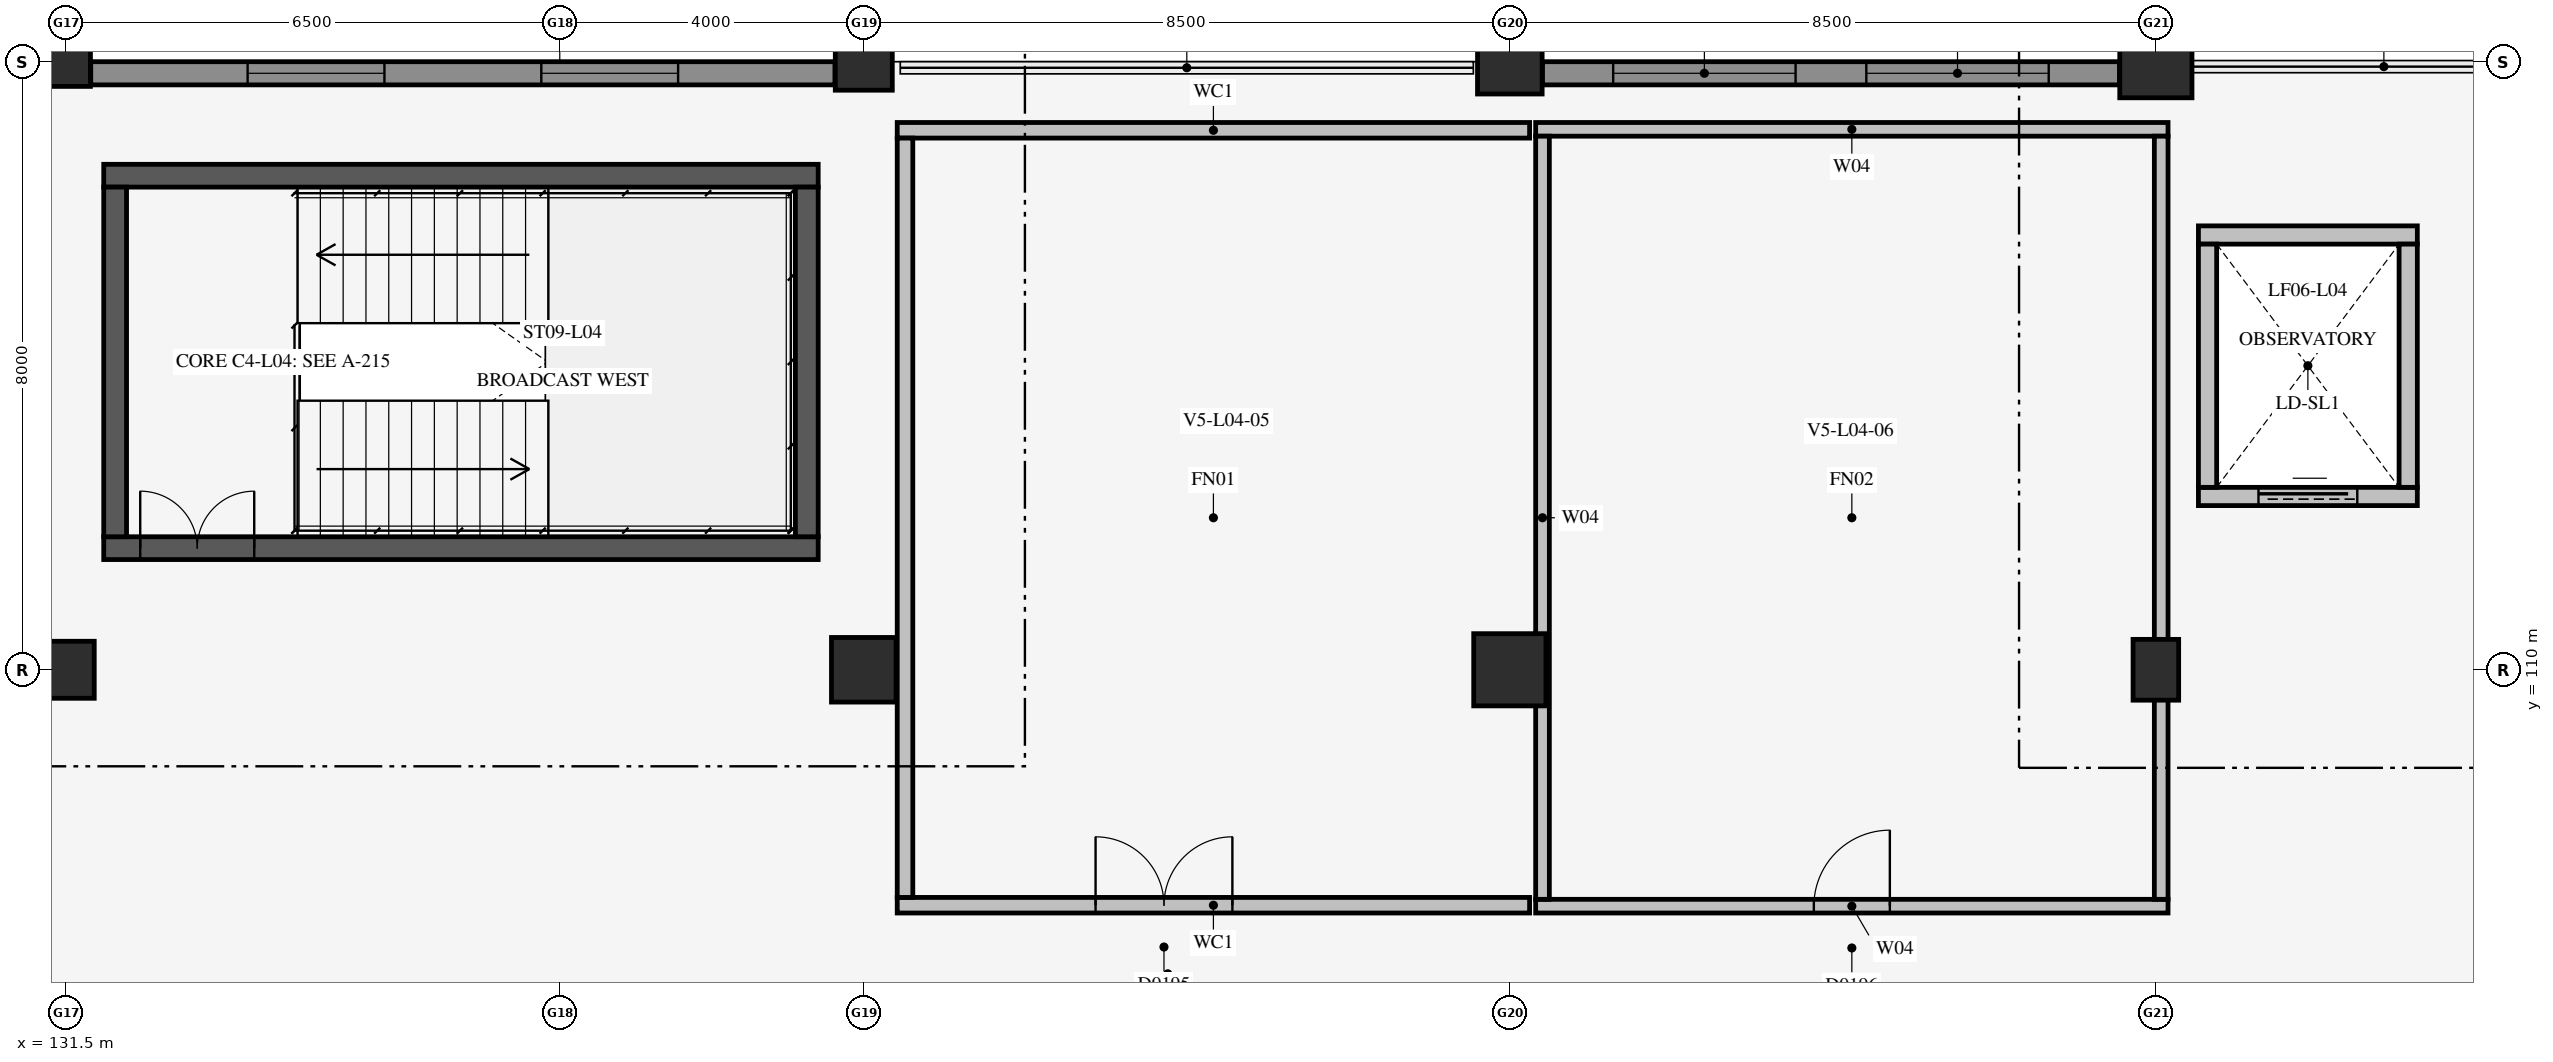
"""IFC4 building model, lengths in metres.
Left out: names, types, materials, properties, quantities, classifications, styles, units other than length and angle.
Written with IfcOpenShell. Run it as: python <this file> out.ifc"""

import sys

from ifc_helpers import new_model, si_unit, direction, frame, frame_2d, origin, origin_2d, place, context, subcontext, project, spatial, rectangle, extrude, element, fill, save


model = new_model("IFC4")
c1 = context("Model", 3, precision=1e-05, world=origin(), true_north=direction((0.0, 1.0)))
c2 = subcontext(c1, "Body", "Model", "MODEL_VIEW")
j1 = project(units=[si_unit("LENGTHUNIT", "METRE"), si_unit("PLANEANGLEUNIT", "RADIAN")], contexts=[c1])
p1 = place(None, origin())
s1 = spatial("IfcSite", under=j1, at=p1, CompositionType="ELEMENT")
p2 = place(p1, origin())
s2 = spatial("IfcBuilding", under=s1, at=p2, CompositionType="ELEMENT")
p3 = place(p2, frame((0.0, 0.0, 19.0)))
s3 = spatial("IfcBuildingStorey", under=s2, at=p3, CompositionType="ELEMENT", Elevation=19.0)
p4 = place(p3, frame((132.0, 111.6, 0.0), z_axis=(0.0, 0.0, 1.0), x_axis=(1.0, 0.0, 0.0)))
e1 = element("IfcWall", 1, at=p4, inside=s3, PredefinedType="SHEAR", context=c2, shape_type="SweptSolid", body=[
    extrude(rectangle(XDim=9.4, YDim=0.3, at=frame_2d((4.7, 0.0))), origin(), (0.0, 0.0, 1.0), 3.85),
])
p5 = place(p4, frame((0.48, 0.0, 0.0)))
e2 = element("IfcOpeningElement", 2, at=p5, cuts=e1, PredefinedType="OPENING", context=c2, shape_type="SweptSolid", body=[
    extrude(rectangle(XDim=1.5, YDim=2.3, at=frame_2d((0.75, 1.15))), frame((0.0, 0.162, 0.0), z_axis=(0.0, -1.0, 0.0), x_axis=(1.0, 0.0, 0.0)), (0.0, 0.0, 1.0), 0.324),
])
p6 = place(p3, frame((132.0, 116.5, 0.0), z_axis=(0.0, 0.0, 1.0), x_axis=(1.0, 0.0, 0.0)))
e3 = element("IfcWall", 3, at=p6, inside=s3, PredefinedType="SHEAR", context=c2, shape_type="SweptSolid", body=[
    extrude(rectangle(XDim=9.4, YDim=0.3, at=frame_2d((4.7, 0.0))), origin(), (0.0, 0.0, 1.0), 3.85),
])
for number, where, z_axis, x_axis in (
    (4, (132.15, 111.75, 0.0), (0.0, 0.0, 1.0), (0.0, 1.0, 0.0)),
    (5, (141.25, 111.75, 0.0), (0.0, 0.0, 1.0), (0.0, 1.0, 0.0)),
):
    element("IfcWall", number, at=place(p3, frame(where, z_axis=z_axis, x_axis=x_axis)), inside=s3, PredefinedType="SHEAR", context=c2, shape_type="SweptSolid", body=[
        extrude(rectangle(XDim=4.6, YDim=0.3, at=frame_2d((2.3, 0.0))), origin(), (0.0, 0.0, 1.0), 3.85),
    ])
p7 = place(p3, frame((159.56, 112.28, 0.0), z_axis=(0.0, 0.0, 1.0), x_axis=(1.0, 0.0, 0.0)))
e6 = element("IfcWall", 6, at=p7, inside=s3, PredefinedType="SOLIDWALL", context=c2, shape_type="SweptSolid", body=[
    extrude(rectangle(XDim=2.88, YDim=0.24, at=frame_2d((1.44, 0.0))), origin(), (0.0, 0.0, 1.0), 3.45),
])
p8 = place(p7, frame((0.79, 0.0, 0.0)))
e7 = element("IfcOpeningElement", 7, at=p8, cuts=e6, PredefinedType="OPENING", context=c2, shape_type="SweptSolid", body=[
    extrude(rectangle(XDim=1.3, YDim=2.25, at=frame_2d((0.65, 1.125))), frame((0.0, 0.132, 0.0), z_axis=(0.0, -1.0, 0.0), x_axis=(1.0, 0.0, 0.0)), (0.0, 0.0, 1.0), 0.264),
])
p9 = place(p3, frame((159.56, 115.72, 0.0), z_axis=(0.0, 0.0, 1.0), x_axis=(1.0, 0.0, 0.0)))
e8 = element("IfcWall", 8, at=p9, inside=s3, PredefinedType="SOLIDWALL", context=c2, shape_type="SweptSolid", body=[
    extrude(rectangle(XDim=2.88, YDim=0.24, at=frame_2d((1.44, 0.0))), origin(), (0.0, 0.0, 1.0), 3.45),
])
for number, where, z_axis, x_axis in (
    (9, (159.68, 112.4, 0.0), (0.0, 0.0, 1.0), (0.0, 1.0, 0.0)),
    (10, (162.32, 112.4, 0.0), (0.0, 0.0, 1.0), (0.0, 1.0, 0.0)),
):
    element("IfcWall", number, at=place(p3, frame(where, z_axis=z_axis, x_axis=x_axis)), inside=s3, PredefinedType="SOLIDWALL", context=c2, shape_type="SweptSolid", body=[
        extrude(rectangle(XDim=3.2, YDim=0.24, at=frame_2d((1.6, 0.0))), origin(), (0.0, 0.0, 1.0), 3.45),
    ])
p10 = place(p3, frame((131.5, 110.0, 0.0), z_axis=(0.0, 0.0, 1.0), x_axis=(1.0, 0.0, 0.0)))
e11 = element("IfcColumn", 11, at=p10, inside=s3, PredefinedType="COLUMN", context=c2, shape_type="SweptSolid", body=[
    extrude(rectangle(XDim=0.75, YDim=0.75, at=origin_2d()), origin(), (0.0, 0.0, 1.0), 3.85),
])
p11 = place(p3, frame((131.5, 118.0, 0.0), z_axis=(0.0, 0.0, 1.0), x_axis=(1.0, 0.0, 0.0)))
e12 = element("IfcColumn", 12, at=p11, inside=s3, PredefinedType="COLUMN", context=c2, shape_type="SweptSolid", body=[
    extrude(rectangle(XDim=0.65, YDim=0.65, at=origin_2d()), origin(), (0.0, 0.0, 1.0), 3.85),
])
p12 = place(p3, frame((142.0, 110.0, 0.0), z_axis=(0.0, 0.0, 1.0), x_axis=(1.0, 0.0, 0.0)))
e13 = element("IfcColumn", 13, at=p12, inside=s3, PredefinedType="COLUMN", context=c2, shape_type="SweptSolid", body=[
    extrude(rectangle(XDim=0.85, YDim=0.85, at=origin_2d()), origin(), (0.0, 0.0, 1.0), 3.85),
])
p13 = place(p3, frame((142.0, 118.0, 0.0), z_axis=(0.0, 0.0, 1.0), x_axis=(1.0, 0.0, 0.0)))
e14 = element("IfcColumn", 14, at=p13, inside=s3, PredefinedType="COLUMN", context=c2, shape_type="SweptSolid", body=[
    extrude(rectangle(XDim=0.75, YDim=0.75, at=origin_2d()), origin(), (0.0, 0.0, 1.0), 3.85),
])
p14 = place(p3, frame((150.5, 110.0, 0.0), z_axis=(0.0, 0.0, 1.0), x_axis=(1.0, 0.0, 0.0)))
e15 = element("IfcColumn", 15, at=p14, inside=s3, PredefinedType="COLUMN", context=c2, shape_type="SweptSolid", body=[
    extrude(rectangle(XDim=0.95, YDim=0.95, at=origin_2d()), origin(), (0.0, 0.0, 1.0), 3.85),
])
p15 = place(p3, frame((150.5, 118.0, 0.0), z_axis=(0.0, 0.0, 1.0), x_axis=(1.0, 0.0, 0.0)))
e16 = element("IfcColumn", 16, at=p15, inside=s3, PredefinedType="COLUMN", context=c2, shape_type="SweptSolid", body=[
    extrude(rectangle(XDim=0.85, YDim=0.85, at=origin_2d()), origin(), (0.0, 0.0, 1.0), 3.85),
])
p16 = place(p3, frame((159.0, 110.0, 0.0), z_axis=(0.0, 0.0, 1.0), x_axis=(1.0, 0.0, 0.0)))
e17 = element("IfcColumn", 17, at=p16, inside=s3, PredefinedType="COLUMN", context=c2, shape_type="SweptSolid", body=[
    extrude(rectangle(XDim=0.6, YDim=0.8, at=origin_2d()), origin(), (0.0, 0.0, 1.0), 3.85),
])
p17 = place(p3, frame((159.0, 118.0, 0.0), z_axis=(0.0, 0.0, 1.0), x_axis=(1.0, 0.0, 0.0)))
e18 = element("IfcColumn", 18, at=p17, inside=s3, PredefinedType="COLUMN", context=c2, shape_type="SweptSolid", body=[
    extrude(rectangle(XDim=0.95, YDim=0.95, at=origin_2d()), origin(), (0.0, 0.0, 1.0), 3.85),
])
p18 = place(p3, frame((142.44, 106.903, 0.0), z_axis=(0.0, 0.0, 1.0), x_axis=(1.0, 0.0, 0.0)))
e19 = element("IfcWall", 19, at=p18, inside=s3, PredefinedType="SOLIDWALL", context=c2, shape_type="SweptSolid", body=[
    extrude(rectangle(XDim=8.32, YDim=0.205, at=frame_2d((4.16, 0.0))), origin(), (0.0, 0.0, 1.0), 3.835),
])
p19 = place(p18, frame((2.61, 0.0, 0.0)))
e20 = element("IfcOpeningElement", 20, at=p19, cuts=e19, PredefinedType="OPENING", context=c2, shape_type="SweptSolid", body=[
    extrude(rectangle(XDim=1.8, YDim=2.35, at=frame_2d((0.9, 1.175))), frame((0.0, 0.115, 0.0), z_axis=(0.0, -1.0, 0.0), x_axis=(1.0, 0.0, 0.0)), (0.0, 0.0, 1.0), 0.229),
])
p20 = place(p3, frame((142.44, 117.097, 0.0), z_axis=(0.0, 0.0, 1.0), x_axis=(1.0, 0.0, 0.0)))
e21 = element("IfcWall", 21, at=p20, inside=s3, PredefinedType="SOLIDWALL", context=c2, shape_type="SweptSolid", body=[
    extrude(rectangle(XDim=8.32, YDim=0.205, at=frame_2d((4.16, 0.0))), origin(), (0.0, 0.0, 1.0), 3.835),
])
p21 = place(p3, frame((142.542, 107.005, 0.0), z_axis=(0.0, 0.0, 1.0), x_axis=(0.0, 1.0, 0.0)))
e22 = element("IfcWall", 22, at=p21, inside=s3, PredefinedType="SOLIDWALL", context=c2, shape_type="SweptSolid", body=[
    extrude(rectangle(XDim=9.99, YDim=0.205, at=frame_2d((4.995, 0.0))), origin(), (0.0, 0.0, 1.0), 3.835),
])
p22 = place(p3, frame((150.84, 106.89, 0.0), z_axis=(0.0, 0.0, 1.0), x_axis=(1.0, 0.0, 0.0)))
e23 = element("IfcWall", 23, at=p22, inside=s3, PredefinedType="PARTITIONING", context=c2, shape_type="SweptSolid", body=[
    extrude(rectangle(XDim=8.32, YDim=0.18, at=frame_2d((4.16, 0.0))), origin(), (0.0, 0.0, 1.0), 3.835),
])
p23 = place(p22, frame((3.66, 0.0, 0.0)))
e24 = element("IfcOpeningElement", 24, at=p23, cuts=e23, PredefinedType="OPENING", context=c2, shape_type="SweptSolid", body=[
    extrude(rectangle(XDim=1.0, YDim=2.2, at=frame_2d((0.5, 1.1))), frame((0.0, 0.102, 0.0), z_axis=(0.0, -1.0, 0.0), x_axis=(1.0, 0.0, 0.0)), (0.0, 0.0, 1.0), 0.204),
])
p24 = place(p3, frame((150.84, 117.11, 0.0), z_axis=(0.0, 0.0, 1.0), x_axis=(1.0, 0.0, 0.0)))
e25 = element("IfcWall", 25, at=p24, inside=s3, PredefinedType="PARTITIONING", context=c2, shape_type="SweptSolid", body=[
    extrude(rectangle(XDim=8.32, YDim=0.18, at=frame_2d((4.16, 0.0))), origin(), (0.0, 0.0, 1.0), 3.835),
])
p25 = place(p3, frame((159.07, 106.98, 0.0), z_axis=(0.0, 0.0, 1.0), x_axis=(0.0, 1.0, 0.0)))
e26 = element("IfcWall", 26, at=p25, inside=s3, PredefinedType="PARTITIONING", context=c2, shape_type="SweptSolid", body=[
    extrude(rectangle(XDim=10.04, YDim=0.18, at=frame_2d((5.02, 0.0))), origin(), (0.0, 0.0, 1.0), 2.961),
])
p26 = place(p3, frame((150.93, 106.98, 0.0), z_axis=(0.0, 0.0, 1.0), x_axis=(0.0, 1.0, 0.0)))
e27 = element("IfcWall", 27, at=p26, inside=s3, PredefinedType="PARTITIONING", context=c2, shape_type="SweptSolid", body=[
    extrude(rectangle(XDim=10.04, YDim=0.18, at=frame_2d((5.02, 0.0))), origin(), (0.0, 0.0, 1.0), 3.835),
])
p27 = place(p3, frame((131.829, 117.847, 0.0), z_axis=(0.0, 0.0, 1.0), x_axis=(1.0, 0.0, 0.0)))
e28 = element("IfcWall", 28, at=p27, inside=s3, PredefinedType="SOLIDWALL", context=c2, shape_type="SweptSolid", body=[
    extrude(rectangle(XDim=9.792, YDim=0.305, at=frame_2d((4.896, 0.0))), origin(), (0.0, 0.0, 1.0), 3.284),
])
p28 = place(p27, frame((2.064, 0.0, 0.95)))
e29 = element("IfcOpeningElement", 29, at=p28, cuts=e28, PredefinedType="OPENING", context=c2, shape_type="SweptSolid", body=[
    extrude(rectangle(XDim=1.8, YDim=1.5, at=frame_2d((0.9, 0.75))), frame((0.0, 0.165, 0.0), z_axis=(0.0, -1.0, 0.0), x_axis=(1.0, 0.0, 0.0)), (0.0, 0.0, 1.0), 0.329),
])
p29 = place(p27, frame((5.928, 0.0, 0.95)))
e30 = element("IfcOpeningElement", 30, at=p29, cuts=e28, PredefinedType="OPENING", context=c2, shape_type="SweptSolid", body=[
    extrude(rectangle(XDim=1.8, YDim=1.5, at=frame_2d((0.9, 0.75))), frame((0.0, 0.165, 0.0), z_axis=(0.0, -1.0, 0.0), x_axis=(1.0, 0.0, 0.0)), (0.0, 0.0, 1.0), 0.329),
])
p30 = place(p3, frame((150.929, 117.847, 0.0), z_axis=(0.0, 0.0, 1.0), x_axis=(1.0, 0.0, 0.0)))
e31 = element("IfcWall", 31, at=p30, inside=s3, PredefinedType="SOLIDWALL", context=c2, shape_type="SweptSolid", body=[
    extrude(rectangle(XDim=7.592, YDim=0.305, at=frame_2d((3.796, 0.0))), origin(), (0.0, 0.0, 1.0), 3.407),
])
p31 = place(p30, frame((0.931, 0.0, 0.95)))
e32 = element("IfcOpeningElement", 32, at=p31, cuts=e31, PredefinedType="OPENING", context=c2, shape_type="SweptSolid", body=[
    extrude(rectangle(XDim=2.4, YDim=1.5, at=frame_2d((1.2, 0.75))), frame((0.0, 0.165, 0.0), z_axis=(0.0, -1.0, 0.0), x_axis=(1.0, 0.0, 0.0)), (0.0, 0.0, 1.0), 0.329),
])
p32 = place(p30, frame((4.261, 0.0, 0.95)))
e33 = element("IfcOpeningElement", 33, at=p32, cuts=e31, PredefinedType="OPENING", context=c2, shape_type="SweptSolid", body=[
    extrude(rectangle(XDim=2.4, YDim=1.5, at=frame_2d((1.2, 0.75))), frame((0.0, 0.165, 0.0), z_axis=(0.0, -1.0, 0.0), x_axis=(1.0, 0.0, 0.0)), (0.0, 0.0, 1.0), 0.329),
])
p33 = place(p5, origin())
e34 = element("IfcDoor", 34, at=p33, inside=s3, OperationType="DOUBLE_DOOR_SINGLE_SWING", PredefinedType="DOOR", context=c2, shape_type="SweptSolid", body=[
    extrude(rectangle(XDim=1.5, YDim=2.3, at=frame_2d((0.75, 1.15))), frame((0.0, 0.025, 0.0), z_axis=(0.0, -1.0, 0.0), x_axis=(1.0, 0.0, 0.0)), (0.0, 0.0, 1.0), 0.05),
])
fill(e2, e34)
p34 = place(p19, origin())
e35 = element("IfcDoor", 35, at=p34, inside=s3, OperationType="DOUBLE_DOOR_SINGLE_SWING", PredefinedType="DOOR", context=c2, shape_type="SweptSolid", body=[
    extrude(rectangle(XDim=1.8, YDim=2.35, at=frame_2d((0.9, 1.175))), frame((0.0, 0.025, 0.0), z_axis=(0.0, -1.0, 0.0), x_axis=(1.0, 0.0, 0.0)), (0.0, 0.0, 1.0), 0.05),
])
fill(e20, e35)
p35 = place(p23, origin())
e36 = element("IfcDoor", 36, at=p35, inside=s3, OperationType="SINGLE_SWING_RIGHT", PredefinedType="DOOR", context=c2, shape_type="SweptSolid", body=[
    extrude(rectangle(XDim=1.0, YDim=2.2, at=frame_2d((0.5, 1.1))), frame((0.0, 0.025, 0.0), z_axis=(0.0, -1.0, 0.0), x_axis=(1.0, 0.0, 0.0)), (0.0, 0.0, 1.0), 0.05),
])
fill(e24, e36)
p36 = place(p28, origin())
e37 = element("IfcWindow", 37, at=p36, inside=s3, PartitioningType="SINGLE_PANEL", PredefinedType="WINDOW", context=c2, shape_type="SweptSolid", body=[
    extrude(rectangle(XDim=1.8, YDim=1.5, at=frame_2d((0.9, 0.75))), frame((0.0, 0.03, 0.0), z_axis=(0.0, -1.0, 0.0), x_axis=(1.0, 0.0, 0.0)), (0.0, 0.0, 1.0), 0.06),
])
fill(e29, e37)
p37 = place(p29, origin())
e38 = element("IfcWindow", 38, at=p37, inside=s3, PartitioningType="SINGLE_PANEL", PredefinedType="WINDOW", context=c2, shape_type="SweptSolid", body=[
    extrude(rectangle(XDim=1.8, YDim=1.5, at=frame_2d((0.9, 0.75))), frame((0.0, 0.03, 0.0), z_axis=(0.0, -1.0, 0.0), x_axis=(1.0, 0.0, 0.0)), (0.0, 0.0, 1.0), 0.06),
])
fill(e30, e38)
p38 = place(p31, origin())
e39 = element("IfcWindow", 39, at=p38, inside=s3, PartitioningType="SINGLE_PANEL", PredefinedType="WINDOW", context=c2, shape_type="SweptSolid", body=[
    extrude(rectangle(XDim=2.4, YDim=1.5, at=frame_2d((1.2, 0.75))), frame((0.0, 0.03, 0.0), z_axis=(0.0, -1.0, 0.0), x_axis=(1.0, 0.0, 0.0)), (0.0, 0.0, 1.0), 0.06),
])
fill(e32, e39)
p39 = place(p32, origin())
e40 = element("IfcWindow", 40, at=p39, inside=s3, PartitioningType="SINGLE_PANEL", PredefinedType="WINDOW", context=c2, shape_type="SweptSolid", body=[
    extrude(rectangle(XDim=2.4, YDim=1.5, at=frame_2d((1.2, 0.75))), frame((0.0, 0.03, 0.0), z_axis=(0.0, -1.0, 0.0), x_axis=(1.0, 0.0, 0.0)), (0.0, 0.0, 1.0), 0.06),
])
fill(e33, e40)
p40 = place(p8, origin())
e41 = element("IfcDoor", 41, at=p40, inside=s3, OperationType="SLIDING_TO_LEFT", PredefinedType="USERDEFINED", context=c2, shape_type="SweptSolid", body=[
    extrude(rectangle(XDim=1.3, YDim=2.25, at=frame_2d((0.65, 1.125))), frame((0.0, 0.025, 0.0), z_axis=(0.0, -1.0, 0.0), x_axis=(1.0, 0.0, 0.0)), (0.0, 0.0, 1.0), 0.05),
])
fill(e7, e41)
save(model, sys.argv[1])
